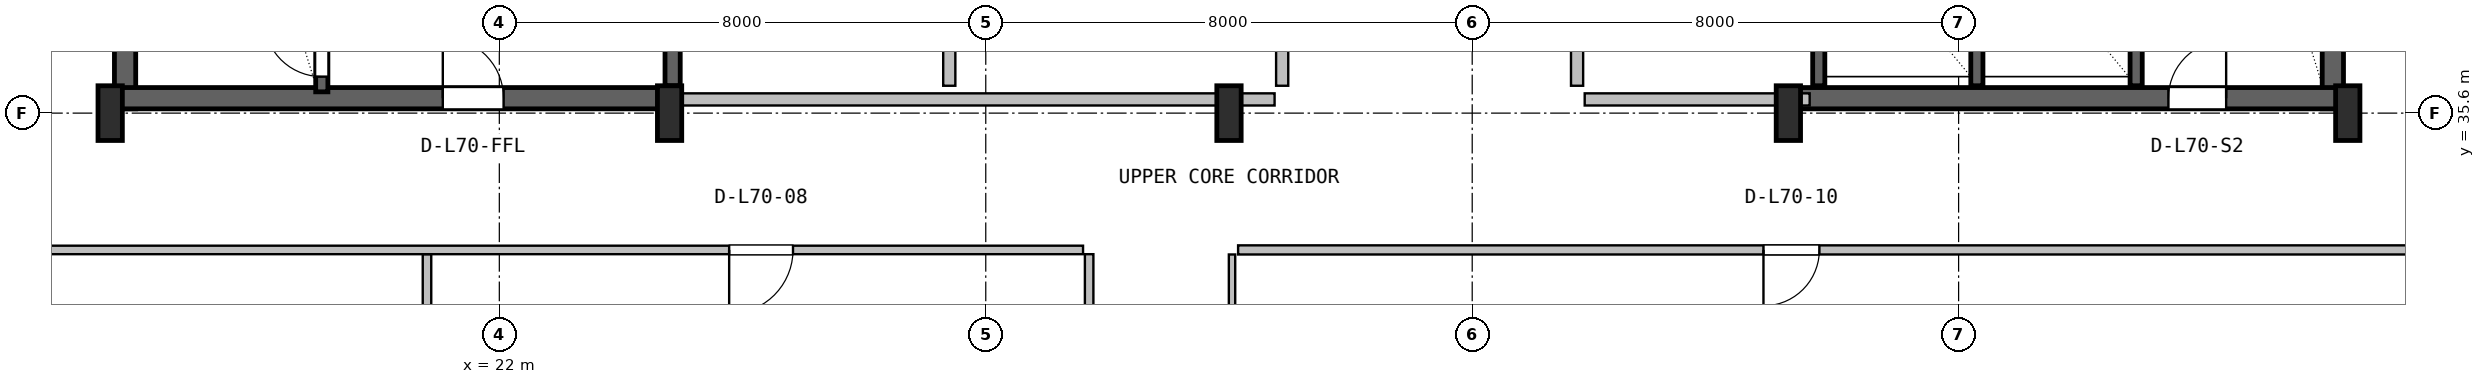
"""IFC4 building model, lengths in metres.
Left out: names, types, materials, properties, quantities, classifications, styles, units other than length and angle.
Written with IfcOpenShell. Run it as: python <this file> out.ifc"""

import sys

from ifc_helpers import new_model, si_unit, direction, frame, frame_2d, origin, origin_2d, place, context, subcontext, project, spatial, rectangle, i_section, extrude, source, transform, mapped, element, fill, save


model = new_model("IFC4")
c1 = context("Model", 3, precision=1e-05, world=origin(), true_north=direction((0.0, 1.0)))
c2 = subcontext(c1, "Body", "Model", "MODEL_VIEW")
j1 = project(units=[si_unit("LENGTHUNIT", "METRE"), si_unit("PLANEANGLEUNIT", "RADIAN")], contexts=[c1])
p1 = place(None, origin())
s1 = spatial("IfcSite", under=j1, at=p1, CompositionType="ELEMENT")
p2 = place(p1, origin())
s2 = spatial("IfcBuilding", under=s1, at=p2, CompositionType="ELEMENT")
p3 = place(p2, frame((0.0, 0.0, 281.2)))
s3 = spatial("IfcBuildingStorey", under=s2, at=p3, CompositionType="ELEMENT", Elevation=281.2)
for number, where, z_axis, x_axis in (
    (1, (15.845, 35.67, 0.0), (0.0, 0.0, 1.0), (0.0, 1.0, 0.0)),
    (2, (52.155, 35.67, 0.0), (0.0, 0.0, 1.0), (0.0, 1.0, 0.0)),
):
    element("IfcWall", number, at=place(p3, frame(where, z_axis=z_axis, x_axis=x_axis)), inside=s3, PredefinedType="SHEAR", context=c2, shape_type="SweptSolid", body=[
        extrude(rectangle(XDim=11.13, YDim=0.35, at=frame_2d((5.565, 0.0))), origin(), (0.0, 0.0, 1.0), 3.55),
    ])
p4 = place(p3, frame((15.67, 35.845, 0.0), z_axis=(0.0, 0.0, 1.0), x_axis=(1.0, 0.0, 0.0)))
e3 = element("IfcWall", 3, at=p4, inside=s3, PredefinedType="SHEAR", context=c2, shape_type="SweptSolid", body=[
    extrude(rectangle(XDim=9.13, YDim=0.35, at=frame_2d((4.565, 0.0))), origin(), (0.0, 0.0, 1.0), 3.55),
])
p5 = place(p4, frame((5.4, 0.0, 0.0)))
e4 = element("IfcOpeningElement", 4, at=p5, cuts=e3, PredefinedType="OPENING", context=c2, shape_type="SweptSolid", body=[
    extrude(rectangle(XDim=1.0, YDim=2.1, at=frame_2d((0.5, 1.05))), frame((0.0, 0.185, 0.0), z_axis=(0.0, -1.0, 0.0), x_axis=(1.0, 0.0, 0.0)), (0.0, 0.0, 1.0), 0.37),
])
p6 = place(p3, frame((43.2, 35.845, 0.0), z_axis=(0.0, 0.0, 1.0), x_axis=(1.0, 0.0, 0.0)))
e5 = element("IfcWall", 5, at=p6, inside=s3, PredefinedType="SHEAR", context=c2, shape_type="SweptSolid", body=[
    extrude(rectangle(XDim=9.13, YDim=0.35, at=frame_2d((4.565, 0.0))), origin(), (0.0, 0.0, 1.0), 3.55),
])
p7 = place(p6, frame((6.25, 0.0, 0.0)))
e6 = element("IfcOpeningElement", 6, at=p7, cuts=e5, PredefinedType="OPENING", context=c2, shape_type="SweptSolid", body=[
    extrude(rectangle(XDim=0.95, YDim=2.1, at=frame_2d((0.475, 1.05))), frame((0.0, 0.185, 0.0), z_axis=(0.0, -1.0, 0.0), x_axis=(1.0, 0.0, 0.0)), (0.0, 0.0, 1.0), 0.37),
])
m1 = source(origin(), c2, "Body", "SweptSolid", [
    extrude(i_section(OverallWidth=0.4, OverallDepth=0.9, WebThickness=0.016, FlangeThickness=0.028, FilletRadius=0.016, at=origin_2d()), origin(), (0.0, 0.0, 1.0), 3.8),
])
for number, where, z_axis, x_axis in (
    (7, (15.6, 35.6, 0.0), (0.0, 0.0, 1.0), (1.0, 0.0, 0.0)),
    (8, (24.8, 35.6, 0.0), (0.0, 0.0, 1.0), (1.0, 0.0, 0.0)),
    (9, (34.0, 35.6, 0.0), (0.0, 0.0, 1.0), (1.0, 0.0, 0.0)),
    (10, (43.2, 35.6, 0.0), (0.0, 0.0, 1.0), (1.0, 0.0, 0.0)),
    (11, (52.4, 35.6, 0.0), (0.0, 0.0, 1.0), (1.0, 0.0, 0.0)),
):
    element("IfcColumn", number, at=place(p3, frame(where, z_axis=z_axis, x_axis=x_axis)), inside=s3, PredefinedType="COLUMN", context=c2, shape_type="MappedRepresentation", body=[
        mapped(m1, transform((0.0, 0.0, 0.0), x_axis=(1.0, 0.0, 0.0), y_axis=(0.0, 1.0, 0.0), z_axis=(0.0, 0.0, 1.0), scale=1.0)),
    ])
p8 = place(p3, frame((19.08, 35.95, 0.0), z_axis=(0.0, 0.0, 1.0), x_axis=(0.0, 1.0, 0.0)))
e12 = element("IfcWall", 12, at=p8, inside=s3, PredefinedType="SHEAR", context=c2, shape_type="SweptSolid", body=[
    extrude(rectangle(XDim=9.65, YDim=0.2, at=frame_2d((4.825, 0.0))), origin(), (0.0, 0.0, 1.0), 3.55),
])
p9 = place(p8, frame((0.25, 0.0, 0.0)))
e13 = element("IfcOpeningElement", 13, at=p9, cuts=e12, PredefinedType="OPENING", context=c2, shape_type="SweptSolid", body=[
    extrude(rectangle(XDim=0.95, YDim=2.1, at=frame_2d((0.475, 1.05))), frame((0.0, 0.11, 0.0), z_axis=(0.0, -1.0, 0.0), x_axis=(1.0, 0.0, 0.0)), (0.0, 0.0, 1.0), 0.22),
])
p10 = place(p3, frame((24.85, 36.05, 0.0), z_axis=(0.0, 0.0, 1.0), x_axis=(0.0, 1.0, 0.0)))
e14 = element("IfcWall", 14, at=p10, inside=s3, PredefinedType="SHEAR", context=c2, shape_type="SweptSolid", body=[
    extrude(rectangle(XDim=10.45, YDim=0.25, at=frame_2d((5.225, 0.0))), origin(), (0.0, 0.0, 1.0), 3.55),
])
p11 = place(p3, frame((48.92, 36.05, 0.0), z_axis=(0.0, 0.0, 1.0), x_axis=(0.0, 1.0, 0.0)))
e15 = element("IfcWall", 15, at=p11, inside=s3, PredefinedType="SHEAR", context=c2, shape_type="SweptSolid", body=[
    extrude(rectangle(XDim=10.5, YDim=0.2, at=frame_2d((5.25, 0.0))), origin(), (0.0, 0.0, 1.0), 3.55),
])
for number, where, z_axis, x_axis in (
    (16, (43.7, 36.05, 0.0), (0.0, 0.0, 1.0), (0.0, 1.0, 0.0)),
    (17, (46.3, 36.05, 0.0), (0.0, 0.0, 1.0), (0.0, 1.0, 0.0)),
):
    element("IfcWall", number, at=place(p3, frame(where, z_axis=z_axis, x_axis=x_axis)), inside=s3, PredefinedType="SHEAR", context=c2, shape_type="SweptSolid", body=[
        extrude(rectangle(XDim=3.05, YDim=0.2, at=frame_2d((1.525, 0.0))), origin(), (0.0, 0.0, 1.0), 3.55),
    ])
p12 = place(p3, frame((25.0, 35.825, 0.0), z_axis=(0.0, 0.0, 1.0), x_axis=(1.0, 0.0, 0.0)))
e18 = element("IfcWall", 18, at=p12, inside=s3, PredefinedType="PLUMBINGWALL", context=c2, shape_type="SweptSolid", body=[
    extrude(rectangle(XDim=9.75, YDim=0.2, at=frame_2d((4.875, 0.0))), origin(), (0.0, 0.0, 1.0), 2.575),
])
for number, where, z_axis, x_axis in (
    (19, (29.4, 36.05, 0.0), (0.0, 0.0, 1.0), (0.0, 1.0, 0.0)),
    (20, (34.875, 36.05, 0.0), (0.0, 0.0, 1.0), (0.0, 1.0, 0.0)),
):
    element("IfcWall", number, at=place(p3, frame(where, z_axis=z_axis, x_axis=x_axis)), inside=s3, PredefinedType="PLUMBINGWALL", context=c2, shape_type="SweptSolid", body=[
        extrude(rectangle(XDim=3.1, YDim=0.2, at=frame_2d((1.55, 0.0))), origin(), (0.0, 0.0, 1.0), 3.53),
    ])
p13 = place(p3, frame((39.85, 35.825, 0.0), z_axis=(0.0, 0.0, 1.0), x_axis=(1.0, 0.0, 0.0)))
e21 = element("IfcWall", 21, at=p13, inside=s3, PredefinedType="SOLIDWALL", context=c2, shape_type="SweptSolid", body=[
    extrude(rectangle(XDim=3.7, YDim=0.2, at=frame_2d((1.85, 0.0))), origin(), (0.0, 0.0, 1.0), 2.575),
])
p14 = place(p3, frame((39.725, 36.05, 0.0), z_axis=(0.0, 0.0, 1.0), x_axis=(0.0, 1.0, 0.0)))
e22 = element("IfcWall", 22, at=p14, inside=s3, PredefinedType="SOLIDWALL", context=c2, shape_type="SweptSolid", body=[
    extrude(rectangle(XDim=3.1, YDim=0.2, at=frame_2d((1.55, 0.0))), origin(), (0.0, 0.0, 1.0), 3.53),
])
p15 = place(p3, frame((31.7, 21.23, 0.0), z_axis=(0.0, 0.0, 1.0), x_axis=(0.0, 1.0, 0.0)))
e23 = element("IfcWall", 23, at=p15, inside=s3, PredefinedType="PARTITIONING", context=c2, shape_type="SweptSolid", body=[
    extrude(rectangle(XDim=12.05, YDim=0.14, at=frame_2d((6.025, 0.0))), origin(), (0.0, 0.0, 1.0), 2.981),
])
p16 = place(p3, frame((20.81, 29.22, 0.0), z_axis=(0.0, 0.0, 1.0), x_axis=(0.0, 1.0, 0.0)))
e24 = element("IfcWall", 24, at=p16, inside=s3, PredefinedType="PARTITIONING", context=c2, shape_type="SweptSolid", body=[
    extrude(rectangle(XDim=4.06, YDim=0.14, at=frame_2d((2.03, 0.0))), origin(), (0.0, 0.0, 1.0), 3.53),
])
p17 = place(p3, frame((12.18, 33.35, 0.0), z_axis=(0.0, 0.0, 1.0), x_axis=(1.0, 0.0, 0.0)))
e25 = element("IfcWall", 25, at=p17, inside=s3, PredefinedType="PARTITIONING", context=c2, shape_type="SweptSolid", body=[
    extrude(rectangle(XDim=19.42, YDim=0.14, at=frame_2d((9.71, 0.0))), origin(), (0.0, 0.0, 1.0), 2.981),
])
p18 = place(p17, frame((13.6, 0.0, 0.0)))
e26 = element("IfcOpeningElement", 26, at=p18, cuts=e25, PredefinedType="OPENING", context=c2, shape_type="SweptSolid", body=[
    extrude(rectangle(XDim=1.05, YDim=2.1, at=frame_2d((0.525, 1.05))), frame((0.0, 0.08, 0.0), z_axis=(0.0, -1.0, 0.0), x_axis=(1.0, 0.0, 0.0)), (0.0, 0.0, 1.0), 0.16),
])
p19 = place(p3, frame((34.05, 13.38, 0.0), z_axis=(0.0, 0.0, 1.0), x_axis=(0.0, 1.0, 0.0)))
e27 = element("IfcWall", 27, at=p19, inside=s3, PredefinedType="PARTITIONING", context=c2, shape_type="SweptSolid", body=[
    extrude(rectangle(XDim=19.895, YDim=0.105, at=frame_2d((9.948, 0.0))), origin(), (0.0, 0.0, 1.0), 2.981),
])
p20 = place(p19, frame((6.705, 0.0, 0.0)))
e28 = element("IfcOpeningElement", 28, at=p20, cuts=e27, PredefinedType="OPENING", context=c2, shape_type="SweptSolid", body=[
    extrude(rectangle(XDim=0.88, YDim=2.06, at=frame_2d((0.44, 1.03))), frame((0.0, 0.062, 0.0), z_axis=(0.0, -1.0, 0.0), x_axis=(1.0, 0.0, 0.0)), (0.0, 0.0, 1.0), 0.125),
])
p21 = place(p3, frame((34.15, 33.35, 0.0), z_axis=(0.0, 0.0, 1.0), x_axis=(1.0, 0.0, 0.0)))
e29 = element("IfcWall", 29, at=p21, inside=s3, PredefinedType="PARTITIONING", context=c2, shape_type="SweptSolid", body=[
    extrude(rectangle(XDim=21.67, YDim=0.15, at=frame_2d((10.835, 0.0))), origin(), (0.0, 0.0, 1.0), 2.981),
])
p22 = place(p21, frame((8.64, 0.0, 0.0)))
e30 = element("IfcOpeningElement", 30, at=p22, cuts=e29, PredefinedType="OPENING", context=c2, shape_type="SweptSolid", body=[
    extrude(rectangle(XDim=0.92, YDim=2.08, at=frame_2d((0.46, 1.04))), frame((0.0, 0.085, 0.0), z_axis=(0.0, -1.0, 0.0), x_axis=(1.0, 0.0, 0.0)), (0.0, 0.0, 1.0), 0.17),
])
m2 = source(origin(), c2, "Body", "SweptSolid", [
    extrude(rectangle(XDim=0.95, YDim=2.1, at=frame_2d((0.475, 1.05))), frame((0.0, 0.025, 0.0), z_axis=(0.0, -1.0, 0.0), x_axis=(1.0, 0.0, 0.0)), (0.0, 0.0, 1.0), 0.05),
])
p23 = place(p9, origin())
e31 = element("IfcDoor", 31, at=p23, inside=s3, OperationType="SINGLE_SWING_RIGHT", PredefinedType="DOOR", context=c2, shape_type="MappedRepresentation", body=[
    mapped(m2, transform((0.0, 0.0, 0.0), x_axis=(1.0, 0.0, 0.0), y_axis=(0.0, 1.0, 0.0), z_axis=(0.0, 0.0, 1.0), scale=1.0)),
])
fill(e13, e31)
m3 = source(origin(), c2, "Body", "SweptSolid", [
    extrude(rectangle(XDim=1.0, YDim=2.1, at=frame_2d((0.5, 1.05))), frame((0.0, 0.025, 0.0), z_axis=(0.0, -1.0, 0.0), x_axis=(1.0, 0.0, 0.0)), (0.0, 0.0, 1.0), 0.05),
])
p24 = place(p5, origin())
e32 = element("IfcDoor", 32, at=p24, inside=s3, OperationType="SINGLE_SWING_LEFT", PredefinedType="DOOR", context=c2, shape_type="MappedRepresentation", body=[
    mapped(m3, transform((0.0, 0.0, 0.0), x_axis=(1.0, 0.0, 0.0), y_axis=(0.0, 1.0, 0.0), z_axis=(0.0, 0.0, 1.0), scale=1.0)),
])
fill(e4, e32)
p25 = place(p7, origin())
e33 = element("IfcDoor", 33, at=p25, inside=s3, OperationType="SINGLE_SWING_RIGHT", PredefinedType="DOOR", context=c2, shape_type="MappedRepresentation", body=[
    mapped(m2, transform((0.0, 0.0, 0.0), x_axis=(1.0, 0.0, 0.0), y_axis=(0.0, 1.0, 0.0), z_axis=(0.0, 0.0, 1.0), scale=1.0)),
])
fill(e6, e33)
m4 = source(origin(), c2, "Body", "SweptSolid", [
    extrude(rectangle(XDim=1.05, YDim=2.1, at=frame_2d((0.525, 1.05))), frame((0.0, 0.025, 0.0), z_axis=(0.0, -1.0, 0.0), x_axis=(1.0, 0.0, 0.0)), (0.0, 0.0, 1.0), 0.05),
])
p26 = place(p18, frame((1.05, 0.0, 0.0), z_axis=(0.0, 0.0, 1.0), x_axis=(-1.0, 0.0, 0.0)))
e34 = element("IfcDoor", 34, at=p26, inside=s3, OperationType="SINGLE_SWING_LEFT", PredefinedType="DOOR", context=c2, shape_type="MappedRepresentation", body=[
    mapped(m4, transform((0.0, 0.0, 0.0), x_axis=(1.0, 0.0, 0.0), y_axis=(0.0, 1.0, 0.0), z_axis=(0.0, 0.0, 1.0), scale=1.0)),
])
fill(e26, e34)
m5 = source(origin(), c2, "Body", "SweptSolid", [
    extrude(rectangle(XDim=0.92, YDim=2.08, at=frame_2d((0.46, 1.04))), frame((0.0, 0.025, 0.0), z_axis=(0.0, -1.0, 0.0), x_axis=(1.0, 0.0, 0.0)), (0.0, 0.0, 1.0), 0.05),
])
p27 = place(p22, frame((0.92, 0.0, 0.0), z_axis=(0.0, 0.0, 1.0), x_axis=(-1.0, 0.0, 0.0)))
e35 = element("IfcDoor", 35, at=p27, inside=s3, OperationType="SINGLE_SWING_LEFT", PredefinedType="DOOR", context=c2, shape_type="MappedRepresentation", body=[
    mapped(m5, transform((0.0, 0.0, 0.0), x_axis=(1.0, 0.0, 0.0), y_axis=(0.0, 1.0, 0.0), z_axis=(0.0, 0.0, 1.0), scale=1.0)),
])
fill(e30, e35)
save(model, sys.argv[1])
